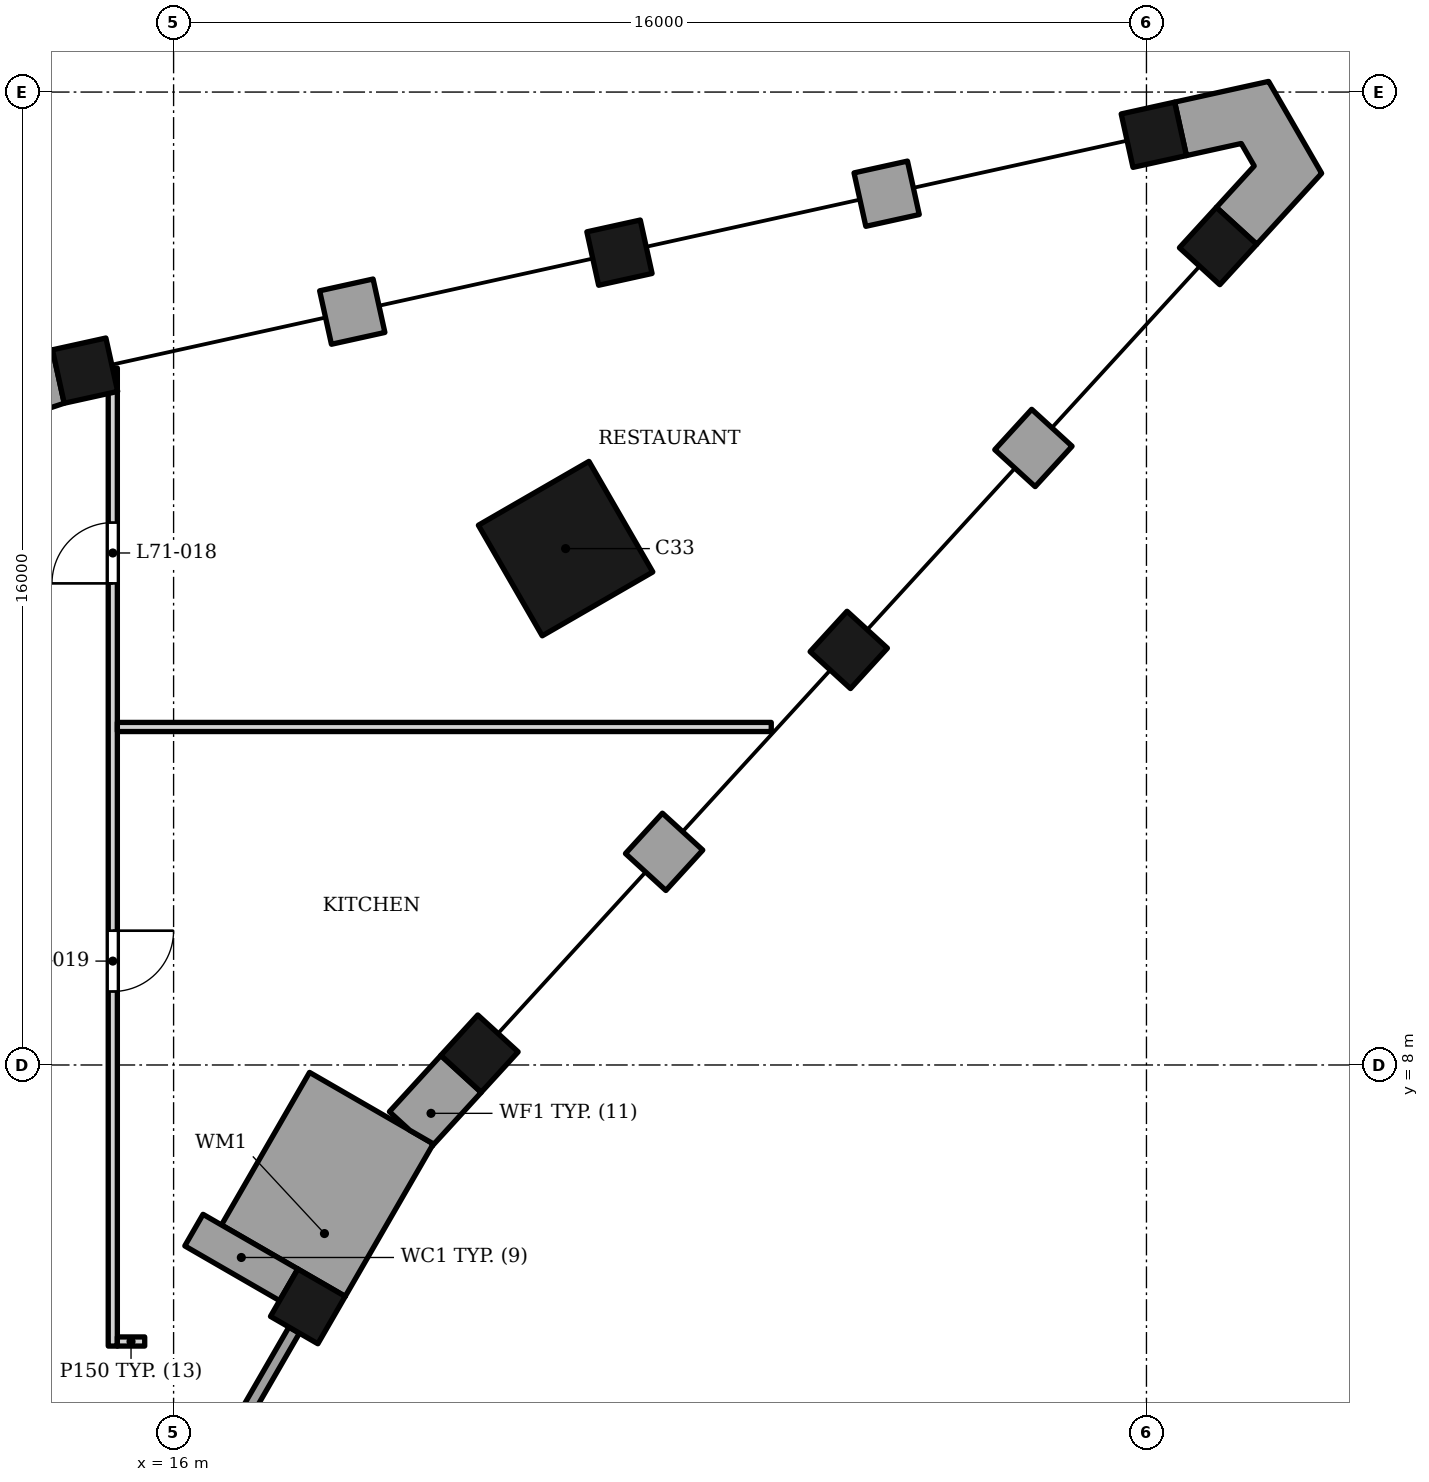
"""IFC4 building model, lengths in metres.
Left out: names, types, materials, properties, quantities, classifications, styles, units other than length and angle.
Written with IfcOpenShell. Run it as: python <this file> out.ifc"""

import sys

from ifc_helpers import new_model, si_unit, direction, frame, frame_2d, origin, origin_2d, place, context, subcontext, project, spatial, polyline, rectangle, outline, extrude, element, fill, save


model = new_model("IFC4")
c1 = context("Model", 3, precision=1e-05, world=origin(), true_north=direction((0.0, 1.0)))
c2 = subcontext(c1, "Body", "Model", "MODEL_VIEW")
j1 = project(units=[si_unit("LENGTHUNIT", "METRE"), si_unit("PLANEANGLEUNIT", "RADIAN")], contexts=[c1])
p1 = place(None, origin())
s1 = spatial("IfcSite", under=j1, at=p1, CompositionType="ELEMENT")
p2 = place(p1, origin())
s2 = spatial("IfcBuilding", under=s1, at=p2, CompositionType="ELEMENT")
p3 = place(p2, frame((0.0, 0.0, 295.0)))
s3 = spatial("IfcBuildingStorey", under=s2, at=p3, CompositionType="ELEMENT", Elevation=295.0)
p4 = place(p3, frame((22.447, 16.492, 0.0), z_axis=(0.0, 0.0, 1.0), x_axis=(-0.866025395058, -0.500000015115, 0.0)))
e1 = element("IfcColumn", 1, at=p4, inside=s3, PredefinedType="COLUMN", context=c2, shape_type="SweptSolid", body=[
    extrude(rectangle(XDim=2.1, YDim=2.1, at=origin_2d()), origin(), (0.0, 0.0, 1.0), 7.5),
])
for number, where, z_axis, x_axis in (
    (2, (18.208, 4.03, 0.0), (0.0, 0.0, 1.0), (0.5, 0.866, 0.0)),
    (3, (21.031, 8.187, 0.0), (0.0, 0.0, 1.0), (0.675, 0.738, 0.0)),
    (4, (27.104, 14.826, 0.0), (0.0, 0.0, 1.0), (0.675, 0.738, 0.0)),
    (5, (33.178, 21.468, 0.0), (0.0, 0.0, 1.0), (0.675, 0.738, 0.0)),
    (6, (32.121, 23.298, 0.0), (0.0, 0.0, 1.0), (-0.977, -0.215, 0.0)),
    (7, (23.333, 21.359, 0.0), (0.0, 0.0, 1.0), (-0.977, -0.215, 0.0)),
    (8, (14.544, 19.419, 0.0), (0.0, 0.0, 1.0), (-0.977, -0.215, 0.0)),
):
    element("IfcColumn", number, at=place(p3, frame(where, z_axis=z_axis, x_axis=x_axis)), inside=s3, PredefinedType="COLUMN", context=c2, shape_type="SweptSolid", body=[
        extrude(rectangle(XDim=0.9, YDim=0.9, at=origin_2d()), origin(), (0.0, 0.0, 1.0), 7.5),
    ])
p5 = place(p3, frame((17.893, 4.385, 0.0), z_axis=(0.0, 0.0, 1.0), x_axis=(-0.866047807691, 0.499961193289, 0.0)))
e9 = element("IfcWall", 9, at=p5, inside=s3, PredefinedType="SOLIDWALL", context=c2, shape_type="SweptSolid", body=[
    extrude(rectangle(XDim=1.8, YDim=0.6, at=frame_2d((0.9, 0.0))), origin(), (0.0, 0.0, 1.0), 6.278),
])
p6 = place(p3, frame((16.183, 0.522, 0.0), z_axis=(0.0, 0.0, 1.0), x_axis=(0.500012057535, 0.866018442252, 0.0)))
e10 = element("IfcWall", 10, at=p6, inside=s3, PredefinedType="SOLIDWALL", context=c2, shape_type="SweptSolid", body=[
    extrude(rectangle(XDim=3.6, YDim=0.2, at=frame_2d((1.8, 0.0))), origin(), (0.0, 0.0, 1.0), 6.5),
])
p7 = place(p3, origin())
e11 = element("IfcWall", 11, at=p7, inside=s3, PredefinedType="SOLIDWALL", context=c2, shape_type="SweptSolid", body=[
    extrude(outline(polyline([(18.823, 4.195), (18.823, 4.194), (18.823, 4.194), (20.271, 6.703), (18.236, 7.878), (16.787, 5.369), (18.043, 4.644), (18.043, 4.645), (18.823, 4.195)])), origin(), (0.0, 0.0, 1.0), 6.278),
])
p8 = place(p3, frame((23.764, 11.173, 0.0), z_axis=(0.0, 0.0, 1.0), x_axis=(0.674802966049, 0.737997938352, 0.0)))
e12 = element("IfcWall", 12, at=p8, inside=s3, PredefinedType="SOLIDWALL", context=c2, shape_type="SweptSolid", body=[
    extrude(rectangle(XDim=0.9, YDim=0.9, at=frame_2d((0.45, 0.0))), origin(), (0.0, 0.0, 1.0), 6.5),
])
p9 = place(p3, frame((30.445, 18.479, 0.0), z_axis=(0.0, 0.0, 1.0), x_axis=(-0.674938051731, -0.737874397391, 0.0)))
e13 = element("IfcWall", 13, at=p9, inside=s3, PredefinedType="SOLIDWALL", context=c2, shape_type="SweptSolid", body=[
    extrude(rectangle(XDim=0.9, YDim=0.9, at=frame_2d((0.45, 0.0))), origin(), (0.0, 0.0, 1.0), 6.5),
])
for number, where, z_axis, x_axis in (
    (14, (28.167, 22.425, 0.0), (0.0, 0.0, 1.0), (-0.976, -0.216, 0.0)),
    (15, (18.499, 20.292, 0.0), (0.0, 0.0, 1.0), (0.976, 0.216, 0.0)),
):
    element("IfcWall", number, at=place(p3, frame(where, z_axis=z_axis, x_axis=x_axis)), inside=s3, PredefinedType="SOLIDWALL", context=c2, shape_type="SweptSolid", body=[
        extrude(rectangle(XDim=0.9, YDim=0.9, at=frame_2d((0.45, 0.0))), origin(), (0.0, 0.0, 1.0), 6.5),
    ])
p10 = place(p3, origin())
e16 = element("IfcWall", 16, at=p10, inside=s3, PredefinedType="SOLIDWALL", context=c2, shape_type="SweptSolid", body=[
    extrude(outline(polyline([(20.395, 8.156), (19.549, 7.232), (19.881, 6.928), (20.271, 6.703), (20.247, 6.661), (21.059, 7.549), (20.395, 8.156)])), origin(), (0.0, 0.0, 1.0), 6.5),
])
p11 = place(p3, origin())
e17 = element("IfcWall", 17, at=p11, inside=s3, PredefinedType="SOLIDWALL", context=c2, shape_type="SweptSolid", body=[
    extrude(outline(polyline([(33.814, 21.496), (34.882, 22.664), (34.009, 24.175), (32.464, 23.834), (32.658, 22.955), (33.559, 23.154), (33.772, 22.785), (33.15, 22.104), (33.814, 21.496)])), origin(), (0.0, 0.0, 1.0), 6.5),
])
p12 = place(p3, origin())
e18 = element("IfcWall", 18, at=p12, inside=s3, PredefinedType="SOLIDWALL", context=c2, shape_type="SweptSolid", body=[
    extrude(outline(polyline([(14.201, 18.883), (14.008, 19.762), (12.784, 19.492), (12.41, 19.052), (12.6, 19.052), (12.6, 18.352), (14.201, 18.883)])), origin(), (0.0, 0.0, 1.0), 6.5),
])
p13 = place(p3, frame((15.0, 3.378, 0.0), z_axis=(0.0, 0.0, 1.0), x_axis=(0.0, 1.0, 0.0)))
e19 = element("IfcWall", 19, at=p13, inside=s3, PredefinedType="PARTITIONING", context=c2, shape_type="SweptSolid", body=[
    extrude(rectangle(XDim=16.084, YDim=0.15, at=frame_2d((8.042, 0.0))), origin(), (0.0, 0.0, 1.0), 6.42),
])
p14 = place(p13, frame((12.542, 0.0, 0.0)))
e20 = element("IfcOpeningElement", 20, at=p14, cuts=e19, PredefinedType="OPENING", context=c2, shape_type="SweptSolid", body=[
    extrude(rectangle(XDim=1.0, YDim=2.1, at=frame_2d((0.5, 1.05))), frame((0.0, 0.085, 0.0), z_axis=(0.0, -1.0, 0.0), x_axis=(1.0, 0.0, 0.0)), (0.0, 0.0, 1.0), 0.17),
])
p15 = place(p13, frame((5.831, 0.0, 0.0)))
e21 = element("IfcOpeningElement", 21, at=p15, cuts=e19, PredefinedType="OPENING", context=c2, shape_type="SweptSolid", body=[
    extrude(rectangle(XDim=1.0, YDim=2.1, at=frame_2d((0.5, 1.05))), frame((0.0, 0.085, 0.0), z_axis=(0.0, -1.0, 0.0), x_axis=(1.0, 0.0, 0.0)), (0.0, 0.0, 1.0), 0.17),
])
p16 = place(p3, frame((15.075, 3.453, 0.0), z_axis=(0.0, 0.0, 1.0), x_axis=(1.0, 0.0, 0.0)))
e22 = element("IfcWall", 22, at=p16, inside=s3, PredefinedType="PARTITIONING", context=c2, shape_type="SweptSolid", body=[
    extrude(rectangle(XDim=0.45, YDim=0.15, at=frame_2d((0.225, 0.0))), origin(), (0.0, 0.0, 1.0), 7.2),
])
p17 = place(p3, frame((15.075, 13.559, 0.0), z_axis=(0.0, 0.0, 1.0), x_axis=(1.0, 0.0, 0.0)))
e23 = element("IfcWall", 23, at=p17, inside=s3, PredefinedType="PARTITIONING", context=c2, shape_type="SweptSolid", body=[
    extrude(rectangle(XDim=10.754, YDim=0.15, at=frame_2d((5.377, 0.0))), origin(), (0.0, 0.0, 1.0), 6.278),
])
p18 = place(p14, origin())
e24 = element("IfcDoor", 24, at=p18, inside=s3, OperationType="SINGLE_SWING_LEFT", PredefinedType="DOOR", context=c2, shape_type="SweptSolid", body=[
    extrude(rectangle(XDim=1.0, YDim=2.1, at=frame_2d((0.5, 1.05))), frame((0.0, 0.025, 0.0), z_axis=(0.0, -1.0, 0.0), x_axis=(1.0, 0.0, 0.0)), (0.0, 0.0, 1.0), 0.05),
])
fill(e20, e24)
p19 = place(p15, origin())
e25 = element("IfcDoor", 25, at=p19, inside=s3, OperationType="SINGLE_SWING_RIGHT", PredefinedType="DOOR", context=c2, shape_type="SweptSolid", body=[
    extrude(rectangle(XDim=1.0, YDim=2.1, at=frame_2d((0.5, 1.05))), frame((0.0, 0.025, 0.0), z_axis=(0.0, -1.0, 0.0), x_axis=(1.0, 0.0, 0.0)), (0.0, 0.0, 1.0), 0.05),
])
fill(e21, e25)
save(model, sys.argv[1])
